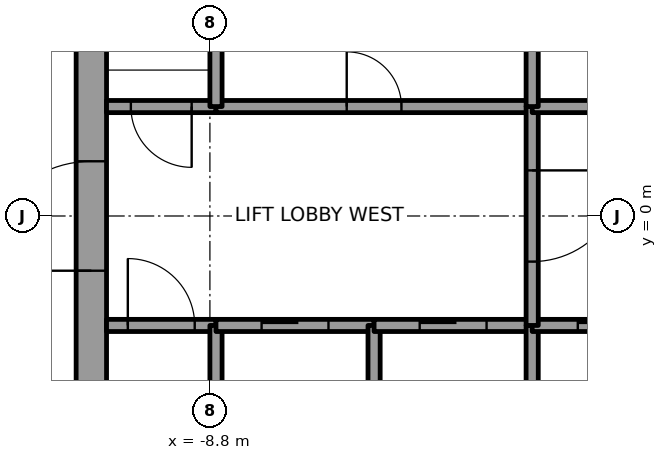
"""IFC4 building model, lengths in metres.
Left out: names, types, materials, properties, quantities, classifications, styles, units other than length and angle.
Written with IfcOpenShell. Run it as: python <this file> out.ifc"""

import sys

from ifc_helpers import new_model, si_unit, direction, frame, frame_2d, origin, place, context, subcontext, project, spatial, rectangle, extrude, element, fill, save


model = new_model("IFC4")
c1 = context("Model", 3, precision=1e-05, world=origin(), true_north=direction((0.0, 1.0)))
c2 = subcontext(c1, "Body", "Model", "MODEL_VIEW")
j1 = project(units=[si_unit("LENGTHUNIT", "METRE"), si_unit("PLANEANGLEUNIT", "RADIAN")], contexts=[c1])
p1 = place(None, origin())
s1 = spatial("IfcSite", under=j1, at=p1, CompositionType="ELEMENT")
p2 = place(p1, origin())
s2 = spatial("IfcBuilding", under=s1, at=p2, CompositionType="ELEMENT")
p3 = place(p2, frame((0.0, 0.0, 259.0)))
s3 = spatial("IfcBuildingStorey", under=s2, at=p3, CompositionType="ELEMENT", Elevation=259.0)
p4 = place(p3, frame((-10.75, -7.5, 0.0), z_axis=(0.0, 0.0, 1.0), x_axis=(0.0, 1.0, 0.0)))
e1 = element("IfcWall", 1, at=p4, inside=s3, PredefinedType="SHEAR", context=c2, shape_type="SweptSolid", body=[
    extrude(rectangle(XDim=15.0, YDim=0.5, at=frame_2d((7.5, 0.0))), origin(), (0.0, 0.0, 1.0), 4.0),
])
p5 = place(p4, frame((6.6, 0.0, 0.0)))
e2 = element("IfcOpeningElement", 2, at=p5, cuts=e1, PredefinedType="OPENING", context=c2, shape_type="SweptSolid", body=[
    extrude(rectangle(XDim=1.8, YDim=2.1, at=frame_2d((0.9, 1.05))), frame((0.0, 0.25, 0.0), z_axis=(0.0, -1.0, 0.0), x_axis=(1.0, 0.0, 0.0)), (0.0, 0.0, 1.0), 0.5),
])
p6 = place(p3, frame((-10.5, -1.8, 0.0), z_axis=(0.0, 0.0, 1.0), x_axis=(1.0, 0.0, 0.0)))
e3 = element("IfcWall", 3, at=p6, inside=s3, PredefinedType="SOLIDWALL", context=c2, shape_type="SweptSolid", body=[
    extrude(rectangle(XDim=1.8, YDim=0.2, at=frame_2d((0.9, 0.0))), origin(), (0.0, 0.0, 1.0), 3.85),
])
p7 = place(p6, frame((0.35, 0.0, 0.0)))
e4 = element("IfcOpeningElement", 4, at=p7, cuts=e3, PredefinedType="OPENING", context=c2, shape_type="SweptSolid", body=[
    extrude(rectangle(XDim=1.1, YDim=2.1, at=frame_2d((0.55, 1.05))), frame((0.0, 0.1, 0.0), z_axis=(0.0, -1.0, 0.0), x_axis=(1.0, 0.0, 0.0)), (0.0, 0.0, 1.0), 0.2),
])
p8 = place(p3, frame((-8.7, 1.8, 0.0), z_axis=(0.0, 0.0, 1.0), x_axis=(-1.0, 0.0, 0.0)))
e5 = element("IfcWall", 5, at=p8, inside=s3, PredefinedType="SOLIDWALL", context=c2, shape_type="SweptSolid", body=[
    extrude(rectangle(XDim=1.8, YDim=0.2, at=frame_2d((0.9, 0.0))), origin(), (0.0, 0.0, 1.0), 3.85),
])
p9 = place(p8, frame((0.4, 0.0, 0.0)))
e6 = element("IfcOpeningElement", 6, at=p9, cuts=e5, PredefinedType="OPENING", context=c2, shape_type="SweptSolid", body=[
    extrude(rectangle(XDim=1.0, YDim=2.1, at=frame_2d((0.5, 1.05))), frame((0.0, 0.1, 0.0), z_axis=(0.0, -1.0, 0.0), x_axis=(1.0, 0.0, 0.0)), (0.0, 0.0, 1.0), 0.2),
])
p10 = place(p3, frame((-8.7, -4.6, 0.0), z_axis=(0.0, 0.0, 1.0), x_axis=(0.0, 1.0, 0.0)))
e7 = element("IfcWall", 7, at=p10, inside=s3, PredefinedType="SOLIDWALL", context=c2, shape_type="SweptSolid", body=[
    extrude(rectangle(XDim=2.8, YDim=0.2, at=frame_2d((1.4, 0.0))), origin(), (0.0, 0.0, 1.0), 3.85),
])
p11 = place(p3, frame((-8.7, -1.8, 0.0), z_axis=(0.0, 0.0, 1.0), x_axis=(1.0, 0.0, 0.0)))
e8 = element("IfcWall", 8, at=p11, inside=s3, PredefinedType="SOLIDWALL", context=c2, shape_type="SweptSolid", body=[
    extrude(rectangle(XDim=2.6, YDim=0.2, at=frame_2d((1.3, 0.0))), origin(), (0.0, 0.0, 1.0), 3.85),
])
p12 = place(p11, frame((0.75, 0.0, 0.0)))
e9 = element("IfcOpeningElement", 9, at=p12, cuts=e8, PredefinedType="OPENING", context=c2, shape_type="SweptSolid", body=[
    extrude(rectangle(XDim=1.1, YDim=2.1, at=frame_2d((0.55, 1.05))), frame((0.0, 0.1, 0.0), z_axis=(0.0, -1.0, 0.0), x_axis=(1.0, 0.0, 0.0)), (0.0, 0.0, 1.0), 0.2),
])
p13 = place(p3, frame((-8.7, 1.8, 0.0), z_axis=(0.0, 0.0, 1.0), x_axis=(1.0, 0.0, 0.0)))
e10 = element("IfcWall", 10, at=p13, inside=s3, PredefinedType="SOLIDWALL", context=c2, shape_type="SweptSolid", body=[
    extrude(rectangle(XDim=5.2, YDim=0.2, at=frame_2d((2.6, 0.0))), origin(), (0.0, 0.0, 1.0), 3.85),
])
p14 = place(p13, frame((2.15, 0.0, 0.0)))
e11 = element("IfcOpeningElement", 11, at=p14, cuts=e10, PredefinedType="OPENING", context=c2, shape_type="SweptSolid", body=[
    extrude(rectangle(XDim=0.9, YDim=2.1, at=frame_2d((0.45, 1.05))), frame((0.0, 0.1, 0.0), z_axis=(0.0, -1.0, 0.0), x_axis=(1.0, 0.0, 0.0)), (0.0, 0.0, 1.0), 0.2),
])
for number, where, z_axis, x_axis in (
    (12, (-8.7, 4.6, 0.0), (0.0, 0.0, 1.0), (0.0, -1.0, 0.0)),
    (13, (-6.1, -4.6, 0.0), (0.0, 0.0, 1.0), (0.0, 1.0, 0.0)),
):
    element("IfcWall", number, at=place(p3, frame(where, z_axis=z_axis, x_axis=x_axis)), inside=s3, PredefinedType="SOLIDWALL", context=c2, shape_type="SweptSolid", body=[
        extrude(rectangle(XDim=2.8, YDim=0.2, at=frame_2d((1.4, 0.0))), origin(), (0.0, 0.0, 1.0), 3.85),
    ])
p15 = place(p3, frame((-6.1, -1.8, 0.0), z_axis=(0.0, 0.0, 1.0), x_axis=(1.0, 0.0, 0.0)))
e14 = element("IfcWall", 14, at=p15, inside=s3, PredefinedType="SOLIDWALL", context=c2, shape_type="SweptSolid", body=[
    extrude(rectangle(XDim=2.6, YDim=0.2, at=frame_2d((1.3, 0.0))), origin(), (0.0, 0.0, 1.0), 3.85),
])
p16 = place(p15, frame((0.75, 0.0, 0.0)))
e15 = element("IfcOpeningElement", 15, at=p16, cuts=e14, PredefinedType="OPENING", context=c2, shape_type="SweptSolid", body=[
    extrude(rectangle(XDim=1.1, YDim=2.1, at=frame_2d((0.55, 1.05))), frame((0.0, 0.1, 0.0), z_axis=(0.0, -1.0, 0.0), x_axis=(1.0, 0.0, 0.0)), (0.0, 0.0, 1.0), 0.2),
])
p17 = place(p3, frame((-3.5, -4.6, 0.0), z_axis=(0.0, 0.0, 1.0), x_axis=(0.0, 1.0, 0.0)))
e16 = element("IfcWall", 16, at=p17, inside=s3, PredefinedType="SOLIDWALL", context=c2, shape_type="SweptSolid", body=[
    extrude(rectangle(XDim=2.8, YDim=0.2, at=frame_2d((1.4, 0.0))), origin(), (0.0, 0.0, 1.0), 3.85),
])
p18 = place(p3, frame((-3.5, -1.8, 0.0), z_axis=(0.0, 0.0, 1.0), x_axis=(1.0, 0.0, 0.0)))
e17 = element("IfcWall", 17, at=p18, inside=s3, PredefinedType="SOLIDWALL", context=c2, shape_type="SweptSolid", body=[
    extrude(rectangle(XDim=2.6, YDim=0.2, at=frame_2d((1.3, 0.0))), origin(), (0.0, 0.0, 1.0), 3.85),
])
p19 = place(p18, frame((0.75, 0.0, 0.0)))
e18 = element("IfcOpeningElement", 18, at=p19, cuts=e17, PredefinedType="OPENING", context=c2, shape_type="SweptSolid", body=[
    extrude(rectangle(XDim=1.1, YDim=2.1, at=frame_2d((0.55, 1.05))), frame((0.0, 0.1, 0.0), z_axis=(0.0, -1.0, 0.0), x_axis=(1.0, 0.0, 0.0)), (0.0, 0.0, 1.0), 0.2),
])
p20 = place(p3, frame((-3.5, 1.8, 0.0), z_axis=(0.0, 0.0, 1.0), x_axis=(0.0, -1.0, 0.0)))
e19 = element("IfcWall", 19, at=p20, inside=s3, PredefinedType="SOLIDWALL", context=c2, shape_type="SweptSolid", body=[
    extrude(rectangle(XDim=3.6, YDim=0.2, at=frame_2d((1.8, 0.0))), origin(), (0.0, 0.0, 1.0), 3.85),
])
p21 = place(p20, frame((1.05, 0.0, 0.0)))
e20 = element("IfcOpeningElement", 20, at=p21, cuts=e19, PredefinedType="OPENING", context=c2, shape_type="SweptSolid", body=[
    extrude(rectangle(XDim=1.5, YDim=2.1, at=frame_2d((0.75, 1.05))), frame((0.0, 0.1, 0.0), z_axis=(0.0, -1.0, 0.0), x_axis=(1.0, 0.0, 0.0)), (0.0, 0.0, 1.0), 0.2),
])
p22 = place(p3, frame((-0.9, 1.8, 0.0), z_axis=(0.0, 0.0, 1.0), x_axis=(-1.0, 0.0, 0.0)))
e21 = element("IfcWall", 21, at=p22, inside=s3, PredefinedType="SOLIDWALL", context=c2, shape_type="SweptSolid", body=[
    extrude(rectangle(XDim=2.6, YDim=0.2, at=frame_2d((1.3, 0.0))), origin(), (0.0, 0.0, 1.0), 3.85),
])
p23 = place(p3, frame((-3.5, 1.8, 0.0), z_axis=(0.0, 0.0, 1.0), x_axis=(0.0, 1.0, 0.0)))
e22 = element("IfcWall", 22, at=p23, inside=s3, PredefinedType="SOLIDWALL", context=c2, shape_type="SweptSolid", body=[
    extrude(rectangle(XDim=2.8, YDim=0.2, at=frame_2d((1.4, 0.0))), origin(), (0.0, 0.0, 1.0), 3.85),
])
p24 = place(p12, origin())
e23 = element("IfcDoor", 23, at=p24, inside=s3, OperationType="SLIDING_TO_LEFT", PredefinedType="DOOR", context=c2, shape_type="SweptSolid", body=[
    extrude(rectangle(XDim=1.1, YDim=2.1, at=frame_2d((0.55, 1.05))), frame((0.0, 0.025, 0.0), z_axis=(0.0, -1.0, 0.0), x_axis=(1.0, 0.0, 0.0)), (0.0, 0.0, 1.0), 0.05),
])
fill(e9, e23)
p25 = place(p16, origin())
e24 = element("IfcDoor", 24, at=p25, inside=s3, OperationType="SLIDING_TO_LEFT", PredefinedType="DOOR", context=c2, shape_type="SweptSolid", body=[
    extrude(rectangle(XDim=1.1, YDim=2.1, at=frame_2d((0.55, 1.05))), frame((0.0, 0.025, 0.0), z_axis=(0.0, -1.0, 0.0), x_axis=(1.0, 0.0, 0.0)), (0.0, 0.0, 1.0), 0.05),
])
fill(e15, e24)
p26 = place(p19, origin())
e25 = element("IfcDoor", 25, at=p26, inside=s3, OperationType="SLIDING_TO_RIGHT", PredefinedType="DOOR", context=c2, shape_type="SweptSolid", body=[
    extrude(rectangle(XDim=1.1, YDim=2.1, at=frame_2d((0.55, 1.05))), frame((0.0, 0.025, 0.0), z_axis=(0.0, -1.0, 0.0), x_axis=(1.0, 0.0, 0.0)), (0.0, 0.0, 1.0), 0.05),
])
fill(e18, e25)
p27 = place(p21, origin())
e26 = element("IfcDoor", 26, at=p27, inside=s3, OperationType="DOUBLE_DOOR_SINGLE_SWING", PredefinedType="DOOR", context=c2, shape_type="SweptSolid", body=[
    extrude(rectangle(XDim=1.5, YDim=2.1, at=frame_2d((0.75, 1.05))), frame((0.0, 0.025, 0.0), z_axis=(0.0, -1.0, 0.0), x_axis=(1.0, 0.0, 0.0)), (0.0, 0.0, 1.0), 0.05),
])
fill(e20, e26)
p28 = place(p7, origin())
e27 = element("IfcDoor", 27, at=p28, inside=s3, OperationType="SINGLE_SWING_LEFT", PredefinedType="DOOR", context=c2, shape_type="SweptSolid", body=[
    extrude(rectangle(XDim=1.1, YDim=2.1, at=frame_2d((0.55, 1.05))), frame((0.0, 0.025, 0.0), z_axis=(0.0, -1.0, 0.0), x_axis=(1.0, 0.0, 0.0)), (0.0, 0.0, 1.0), 0.05),
])
fill(e4, e27)
p29 = place(p9, origin())
e28 = element("IfcDoor", 28, at=p29, inside=s3, OperationType="SINGLE_SWING_RIGHT", PredefinedType="DOOR", context=c2, shape_type="SweptSolid", body=[
    extrude(rectangle(XDim=1.0, YDim=2.1, at=frame_2d((0.5, 1.05))), frame((0.0, 0.025, 0.0), z_axis=(0.0, -1.0, 0.0), x_axis=(1.0, 0.0, 0.0)), (0.0, 0.0, 1.0), 0.05),
])
fill(e6, e28)
p30 = place(p14, origin())
e29 = element("IfcDoor", 29, at=p30, inside=s3, OperationType="SINGLE_SWING_LEFT", PredefinedType="DOOR", context=c2, shape_type="SweptSolid", body=[
    extrude(rectangle(XDim=0.9, YDim=2.1, at=frame_2d((0.45, 1.05))), frame((0.0, 0.025, 0.0), z_axis=(0.0, -1.0, 0.0), x_axis=(1.0, 0.0, 0.0)), (0.0, 0.0, 1.0), 0.05),
])
fill(e11, e29)
p31 = place(p5, origin())
e30 = element("IfcDoor", 30, at=p31, inside=s3, OperationType="DOUBLE_DOOR_SINGLE_SWING", PredefinedType="DOOR", context=c2, shape_type="SweptSolid", body=[
    extrude(rectangle(XDim=1.8, YDim=2.1, at=frame_2d((0.9, 1.05))), frame((0.0, 0.025, 0.0), z_axis=(0.0, -1.0, 0.0), x_axis=(1.0, 0.0, 0.0)), (0.0, 0.0, 1.0), 0.05),
])
fill(e2, e30)
save(model, sys.argv[1])
